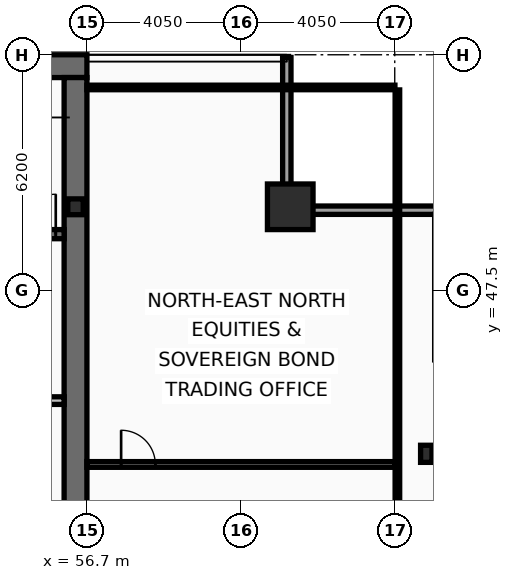
"""IFC4 building model, lengths in metres.
Left out: names, types, materials, properties, quantities, classifications, styles, units other than length and angle.
Written with IfcOpenShell. Run it as: python <this file> out.ifc"""

import sys

from ifc_helpers import new_model, si_unit, direction, frame, frame_2d, origin, origin_2d, place, context, subcontext, project, spatial, rectangle, hollow_rectangle, i_section, extrude, element, fill, save


model = new_model("IFC4")
c1 = context("Model", 3, precision=1e-05, world=origin(), true_north=direction((0.0, 1.0)))
c2 = subcontext(c1, "Body", "Model", "MODEL_VIEW")
j1 = project(units=[si_unit("LENGTHUNIT", "METRE"), si_unit("PLANEANGLEUNIT", "RADIAN")], contexts=[c1])
p1 = place(None, origin())
s1 = spatial("IfcSite", under=j1, at=p1, CompositionType="ELEMENT")
p2 = place(p1, origin())
s2 = spatial("IfcBuilding", under=s1, at=p2, CompositionType="ELEMENT")
p3 = place(p2, frame((0.0, 0.0, 221.0)))
s3 = spatial("IfcBuildingStorey", under=s2, at=p3, CompositionType="ELEMENT", Elevation=221.0)
p4 = place(p3, frame((16.2, 53.4, 0.0), z_axis=(0.0, 0.0, 1.0), x_axis=(1.0, 0.0, 0.0)))
e1 = element("IfcWall", 1, at=p4, inside=s3, PredefinedType="SHEAR", context=c2, shape_type="SweptSolid", body=[
    extrude(rectangle(XDim=40.5, YDim=0.6, at=frame_2d((20.25, 0.0))), origin(), (0.0, 0.0, 1.0), 3.44),
])
p5 = place(p3, frame((56.4, 53.1, 0.0), z_axis=(0.0, 0.0, 1.0), x_axis=(0.0, -1.0, 0.0)))
e2 = element("IfcWall", 2, at=p5, inside=s3, PredefinedType="SHEAR", context=c2, shape_type="SweptSolid", body=[
    extrude(rectangle(XDim=11.2, YDim=0.6, at=frame_2d((5.6, 0.0))), origin(), (0.0, 0.0, 1.0), 3.44),
])
p6 = place(p3, frame((48.63, 48.98, 0.0), z_axis=(0.0, 0.0, 1.0), x_axis=(1.0, 0.0, 0.0)))
e3 = element("IfcWall", 3, at=p6, inside=s3, PredefinedType="SHEAR", context=c2, shape_type="SweptSolid", body=[
    extrude(rectangle(XDim=7.47, YDim=0.24, at=frame_2d((3.735, 0.0))), origin(), (0.0, 0.0, 1.0), 3.44),
])
p7 = place(p6, frame((6.2, 0.0, 0.0)))
e4 = element("IfcOpeningElement", 4, at=p7, cuts=e3, PredefinedType="OPENING", context=c2, shape_type="SweptSolid", body=[
    extrude(rectangle(XDim=1.05, YDim=2.15, at=frame_2d((0.525, 1.075))), frame((0.0, 0.13, 0.0), z_axis=(0.0, -1.0, 0.0), x_axis=(1.0, 0.0, 0.0)), (0.0, 0.0, 1.0), 0.26),
])
p8 = place(p3, frame((62.05, 49.7, 0.0), z_axis=(0.0, 0.0, 1.0), x_axis=(1.0, 0.0, 0.0)))
e5 = element("IfcColumn", 5, at=p8, inside=s3, PredefinedType="COLUMN", context=c2, shape_type="SweptSolid", body=[
    extrude(hollow_rectangle(XDim=1.2, YDim=1.2, WallThickness=0.06, at=origin_2d()), origin(), (0.0, 0.0, 1.0), 3.6),
])
p9 = place(p3, frame((65.63, 43.2, 0.0), z_axis=(0.0, 0.0, 1.0), x_axis=(1.0, 0.0, 0.0)))
e6 = element("IfcColumn", 6, at=p9, inside=s3, PredefinedType="COLUMN", context=c2, shape_type="SweptSolid", body=[
    extrude(i_section(OverallWidth=0.3, OverallDepth=0.45, WebThickness=0.014, FlangeThickness=0.026, at=origin_2d()), origin(), (0.0, 0.0, 1.0), 3.6),
])
p10 = place(p3, frame((56.4, 49.7, 0.0), z_axis=(0.0, 0.0, 1.0), x_axis=(1.0, 0.0, 0.0)))
e7 = element("IfcColumn", 7, at=p10, inside=s3, PredefinedType="COLUMN", context=c2, shape_type="SweptSolid", body=[
    extrude(i_section(OverallWidth=0.406, OverallDepth=0.416, WebThickness=0.03, FlangeThickness=0.048, at=origin_2d()), origin(), (0.0, 0.0, 1.0), 3.6),
])
p11 = place(p3, frame((61.96, 53.63, 0.0), z_axis=(0.0, 0.0, 1.0), x_axis=(0.0, -1.0, 0.0)))
e8 = element("IfcWall", 8, at=p11, inside=s3, PredefinedType="SOLIDWALL", context=c2, shape_type="SweptSolid", body=[
    extrude(rectangle(XDim=3.91, YDim=0.22, at=frame_2d((1.955, 0.0))), origin(), (0.0, 0.0, 1.0), 2.83),
])
p12 = place(p3, frame((61.85, 49.61, 0.0), z_axis=(0.0, 0.0, 1.0), x_axis=(1.0, 0.0, 0.0)))
e9 = element("IfcWall", 9, at=p12, inside=s3, PredefinedType="SOLIDWALL", context=c2, shape_type="SweptSolid", body=[
    extrude(rectangle(XDim=4.22, YDim=0.22, at=frame_2d((2.11, 0.0))), origin(), (0.0, 0.0, 1.0), 2.83),
])
p13 = place(p3, frame((51.9, 44.6, 0.0), z_axis=(0.0, 0.0, 1.0), x_axis=(1.0, 0.0, 0.0)))
e10 = element("IfcWall", 10, at=p13, inside=s3, PredefinedType="PARTITIONING", context=c2, shape_type="SweptSolid", body=[
    extrude(rectangle(XDim=4.2, YDim=0.2, at=frame_2d((2.1, 0.0))), origin(), (0.0, 0.0, 1.0), 3.44),
])
p14 = place(p13, frame((1.15, 0.0, 0.0)))
e11 = element("IfcOpeningElement", 11, at=p14, cuts=e10, PredefinedType="OPENING", context=c2, shape_type="SweptSolid", body=[
    extrude(rectangle(XDim=1.05, YDim=2.15, at=frame_2d((0.525, 1.075))), frame((0.0, 0.11, 0.0), z_axis=(0.0, -1.0, 0.0), x_axis=(1.0, 0.0, 0.0)), (0.0, 0.0, 1.0), 0.22),
])
p15 = place(p3, frame((56.7, 42.92, 0.0), z_axis=(0.0, 0.0, 1.0), x_axis=(1.0, 0.0, 0.0)))
e12 = element("IfcWall", 12, at=p15, inside=s3, PredefinedType="PARTITIONING", context=c2, shape_type="SweptSolid", body=[
    extrude(rectangle(XDim=8.105, YDim=0.15, at=frame_2d((4.052, 0.0))), origin(), (0.0, 0.0, 1.0), 2.78),
])
p16 = place(p15, frame((0.9, 0.0, 0.0)))
e13 = element("IfcOpeningElement", 13, at=p16, cuts=e12, PredefinedType="OPENING", context=c2, shape_type="SweptSolid", body=[
    extrude(rectangle(XDim=0.9, YDim=2.05, at=frame_2d((0.45, 1.025))), frame((0.0, 0.085, 0.0), z_axis=(0.0, -1.0, 0.0), x_axis=(1.0, 0.0, 0.0)), (0.0, 0.0, 1.0), 0.17),
])
p17 = place(p3, frame((64.87, 10.665, 0.0), z_axis=(0.0, 0.0, 1.0), x_axis=(0.0, 1.0, 0.0)))
e14 = element("IfcWall", 14, at=p17, inside=s3, PredefinedType="PARTITIONING", context=c2, shape_type="SweptSolid", body=[
    extrude(rectangle(XDim=42.11, YDim=0.12, at=frame_2d((21.055, 0.0))), origin(), (0.0, 0.0, 1.0), 2.78),
])
p18 = place(p3, frame((56.7, 52.84, 0.0), z_axis=(0.0, 0.0, 1.0), x_axis=(1.0, 0.0, 0.0)))
e15 = element("IfcWall", 15, at=p18, inside=s3, PredefinedType="PARTITIONING", context=c2, shape_type="SweptSolid", body=[
    extrude(rectangle(XDim=8.105, YDim=0.12, at=frame_2d((4.052, 0.0))), origin(), (0.0, 0.0, 1.0), 3.44),
])
p19 = place(p7, origin())
e16 = element("IfcDoor", 16, at=p19, inside=s3, OperationType="SINGLE_SWING_RIGHT", PredefinedType="DOOR", context=c2, shape_type="SweptSolid", body=[
    extrude(rectangle(XDim=1.05, YDim=2.15, at=frame_2d((0.525, 1.075))), frame((0.0, 0.025, 0.0), z_axis=(0.0, -1.0, 0.0), x_axis=(1.0, 0.0, 0.0)), (0.0, 0.0, 1.0), 0.05),
])
fill(e4, e16)
p20 = place(p16, origin())
e17 = element("IfcDoor", 17, at=p20, inside=s3, OperationType="SINGLE_SWING_LEFT", PredefinedType="DOOR", context=c2, shape_type="SweptSolid", body=[
    extrude(rectangle(XDim=0.9, YDim=2.05, at=frame_2d((0.45, 1.025))), frame((0.0, 0.025, 0.0), z_axis=(0.0, -1.0, 0.0), x_axis=(1.0, 0.0, 0.0)), (0.0, 0.0, 1.0), 0.05),
])
fill(e13, e17)
save(model, sys.argv[1])
